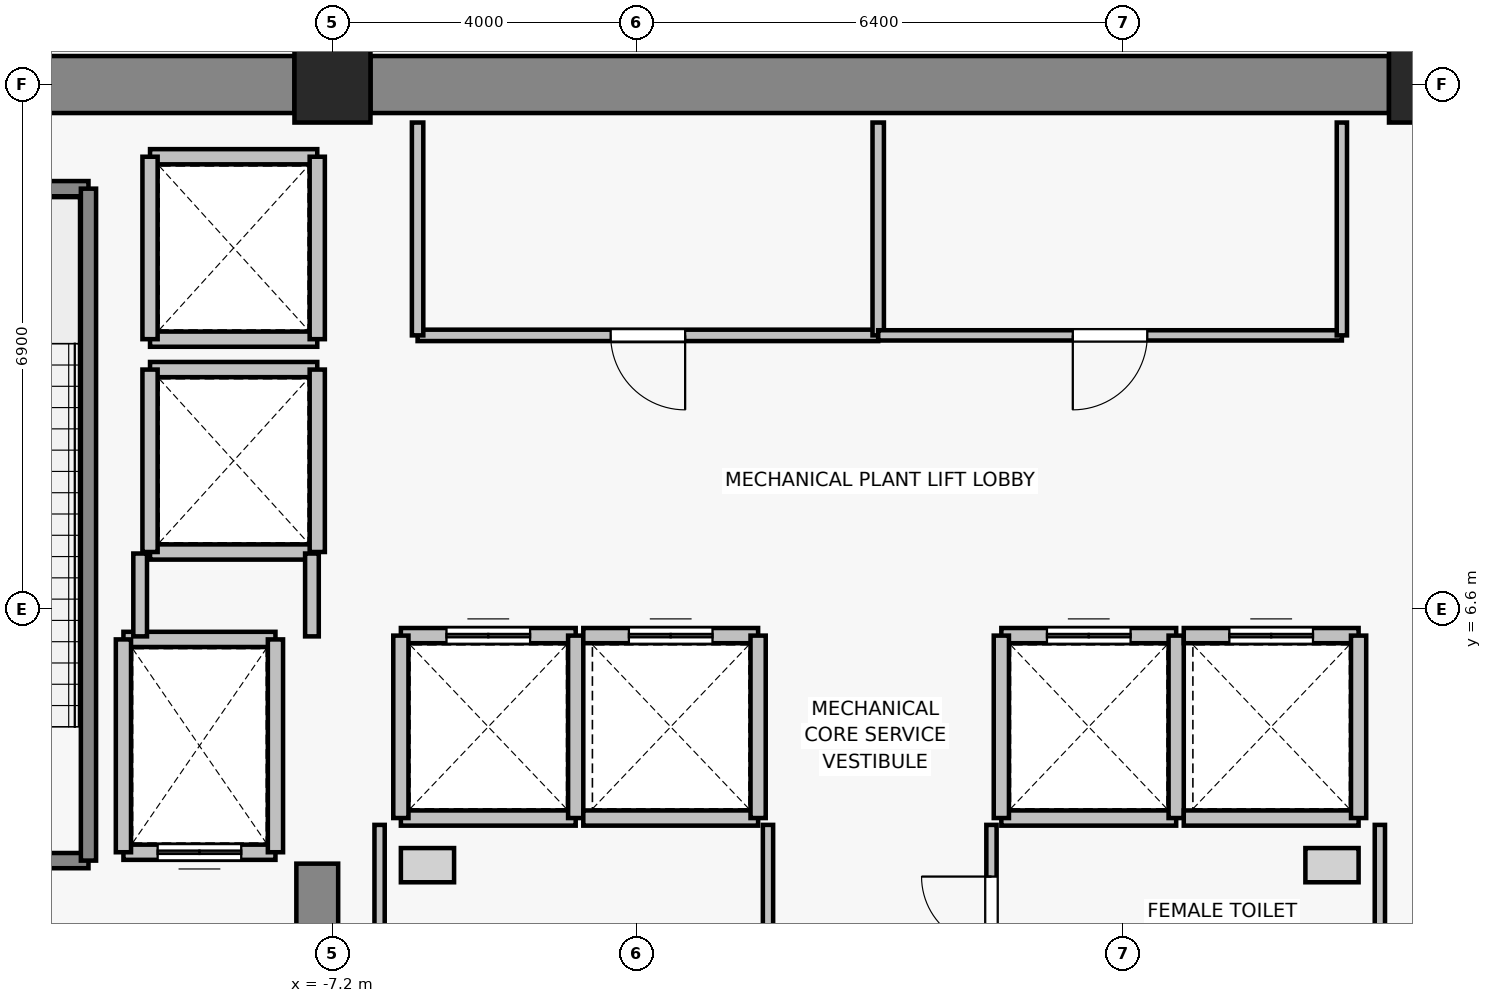
"""IFC4 building model, lengths in metres.
Left out: names, types, materials, properties, quantities, classifications, styles, units other than length and angle.
Written with IfcOpenShell. Run it as: python <this file> out.ifc"""

import sys

from ifc_helpers import new_model, si_unit, direction, frame, frame_2d, origin, origin_2d, place, context, subcontext, project, spatial, rectangle, extrude, source, transform, mapped, element, fill, save


model = new_model("IFC4")
c1 = context("Model", 3, precision=1e-05, world=origin(), true_north=direction((0.0, 1.0)))
c2 = subcontext(c1, "Body", "Model", "MODEL_VIEW")
j1 = project(units=[si_unit("LENGTHUNIT", "METRE"), si_unit("PLANEANGLEUNIT", "RADIAN")], contexts=[c1])
p1 = place(None, origin())
s1 = spatial("IfcSite", under=j1, at=p1, CompositionType="ELEMENT")
p2 = place(p1, origin())
s2 = spatial("IfcBuilding", under=s1, at=p2, CompositionType="ELEMENT")
p3 = place(p2, frame((0.0, 0.0, 139.6)))
s3 = spatial("IfcBuildingStorey", under=s2, at=p3, CompositionType="ELEMENT", Elevation=139.6)
for number, where, z_axis, x_axis in (
    (1, (-7.2, 13.5, 0.0), (0.0, 0.0, 1.0), (1.0, 0.0, 0.0)),
    (2, (7.2, 13.5, 0.0), (0.0, 0.0, 1.0), (1.0, 0.0, 0.0)),
):
    element("IfcColumn", number, at=place(p3, frame(where, z_axis=z_axis, x_axis=x_axis)), inside=s3, PredefinedType="COLUMN", context=c2, shape_type="SweptSolid", body=[
        extrude(rectangle(XDim=1.0, YDim=1.0, at=origin_2d()), origin(), (0.0, 0.0, 1.0), 6.6),
    ])
p4 = place(p3, frame((-13.9, 13.5, 0.0), z_axis=(0.0, 0.0, 1.0), x_axis=(1.0, 0.0, 0.0)))
e3 = element("IfcWall", 3, at=p4, inside=s3, PredefinedType="SHEAR", context=c2, shape_type="SweptSolid", body=[
    extrude(rectangle(XDim=6.2, YDim=0.75, at=frame_2d((3.1, 0.0))), origin(), (0.0, 0.0, 1.0), 6.375),
])
p5 = place(p3, frame((-6.7, 13.5, 0.0), z_axis=(0.0, 0.0, 1.0), x_axis=(1.0, 0.0, 0.0)))
e4 = element("IfcWall", 4, at=p5, inside=s3, PredefinedType="SHEAR", context=c2, shape_type="SweptSolid", body=[
    extrude(rectangle(XDim=13.4, YDim=0.75, at=frame_2d((6.7, 0.0))), origin(), (0.0, 0.0, 1.0), 6.375),
])
p6 = place(p3, frame((-7.4, -0.825, 0.0), z_axis=(0.0, 0.0, 1.0), x_axis=(0.0, 1.0, 0.0)))
e5 = element("IfcWall", 5, at=p6, inside=s3, PredefinedType="SHEAR", context=c2, shape_type="SweptSolid", body=[
    extrude(rectangle(XDim=4.075, YDim=0.55, at=frame_2d((2.038, 0.0))), origin(), (0.0, 0.0, 1.0), 6.375),
])
p7 = place(p3, frame((-7.95, 3.4, 0.0), z_axis=(0.0, 0.0, 1.0), x_axis=(-1.0, 0.0, 0.0)))
e6 = element("IfcWall", 6, at=p7, inside=s3, PredefinedType="SOLIDWALL", context=c2, shape_type="SweptSolid", body=[
    extrude(rectangle(XDim=2.0, YDim=0.2, at=frame_2d((1.0, 0.0))), origin(), (0.0, 0.0, 1.0), 6.375),
])
p8 = place(p7, frame((0.45, 0.0, 0.0)))
e7 = element("IfcOpeningElement", 7, at=p8, cuts=e6, PredefinedType="OPENING", context=c2, shape_type="SweptSolid", body=[
    extrude(rectangle(XDim=1.1, YDim=2.2, at=frame_2d((0.55, 1.1))), frame((0.0, 0.11, 0.0), z_axis=(0.0, -1.0, 0.0), x_axis=(1.0, 0.0, 0.0)), (0.0, 0.0, 1.0), 0.22),
])
p9 = place(p3, frame((-9.95, 6.2, 0.0), z_axis=(0.0, 0.0, 1.0), x_axis=(1.0, 0.0, 0.0)))
e8 = element("IfcWall", 8, at=p9, inside=s3, PredefinedType="SOLIDWALL", context=c2, shape_type="SweptSolid", body=[
    extrude(rectangle(XDim=2.0, YDim=0.2, at=frame_2d((1.0, 0.0))), origin(), (0.0, 0.0, 1.0), 6.375),
])
for number, where, z_axis, x_axis in (
    (9, (-9.95, 3.4, 0.0), (0.0, 0.0, 1.0), (0.0, 1.0, 0.0)),
    (10, (-7.95, 6.2, 0.0), (0.0, 0.0, 1.0), (0.0, -1.0, 0.0)),
):
    element("IfcWall", number, at=place(p3, frame(where, z_axis=z_axis, x_axis=x_axis)), inside=s3, PredefinedType="SOLIDWALL", context=c2, shape_type="SweptSolid", body=[
        extrude(rectangle(XDim=2.8, YDim=0.2, at=frame_2d((1.4, 0.0))), origin(), (0.0, 0.0, 1.0), 6.375),
    ])
p10 = place(p3, frame((-4.0, 3.85, 0.0), z_axis=(0.0, 0.0, 1.0), x_axis=(-1.0, 0.0, 0.0)))
e11 = element("IfcWall", 11, at=p10, inside=s3, PredefinedType="SOLIDWALL", context=c2, shape_type="SweptSolid", body=[
    extrude(rectangle(XDim=2.3, YDim=0.2, at=frame_2d((1.15, 0.0))), origin(), (0.0, 0.0, 1.0), 6.375),
])
p11 = place(p3, frame((-6.3, 6.25, 0.0), z_axis=(0.0, 0.0, 1.0), x_axis=(1.0, 0.0, 0.0)))
e12 = element("IfcWall", 12, at=p11, inside=s3, PredefinedType="SOLIDWALL", context=c2, shape_type="SweptSolid", body=[
    extrude(rectangle(XDim=2.3, YDim=0.2, at=frame_2d((1.15, 0.0))), origin(), (0.0, 0.0, 1.0), 6.375),
])
p12 = place(p11, frame((0.6, 0.0, 0.0)))
e13 = element("IfcOpeningElement", 13, at=p12, cuts=e12, PredefinedType="OPENING", context=c2, shape_type="SweptSolid", body=[
    extrude(rectangle(XDim=1.1, YDim=2.2, at=frame_2d((0.55, 1.1))), frame((0.0, 0.11, 0.0), z_axis=(0.0, -1.0, 0.0), x_axis=(1.0, 0.0, 0.0)), (0.0, 0.0, 1.0), 0.22),
])
for number, where, z_axis, x_axis in (
    (14, (-6.3, 3.85, 0.0), (0.0, 0.0, 1.0), (0.0, 1.0, 0.0)),
    (15, (-4.0, 6.25, 0.0), (0.0, 0.0, 1.0), (0.0, -1.0, 0.0)),
):
    element("IfcWall", number, at=place(p3, frame(where, z_axis=z_axis, x_axis=x_axis)), inside=s3, PredefinedType="SOLIDWALL", context=c2, shape_type="SweptSolid", body=[
        extrude(rectangle(XDim=2.4, YDim=0.2, at=frame_2d((1.2, 0.0))), origin(), (0.0, 0.0, 1.0), 6.375),
    ])
p13 = place(p3, frame((-1.6, 3.85, 0.0), z_axis=(0.0, 0.0, 1.0), x_axis=(-1.0, 0.0, 0.0)))
e16 = element("IfcWall", 16, at=p13, inside=s3, PredefinedType="SOLIDWALL", context=c2, shape_type="SweptSolid", body=[
    extrude(rectangle(XDim=2.3, YDim=0.2, at=frame_2d((1.15, 0.0))), origin(), (0.0, 0.0, 1.0), 6.375),
])
p14 = place(p3, frame((-3.9, 6.25, 0.0), z_axis=(0.0, 0.0, 1.0), x_axis=(1.0, 0.0, 0.0)))
e17 = element("IfcWall", 17, at=p14, inside=s3, PredefinedType="SOLIDWALL", context=c2, shape_type="SweptSolid", body=[
    extrude(rectangle(XDim=2.3, YDim=0.2, at=frame_2d((1.15, 0.0))), origin(), (0.0, 0.0, 1.0), 6.375),
])
p15 = place(p14, frame((0.6, 0.0, 0.0)))
e18 = element("IfcOpeningElement", 18, at=p15, cuts=e17, PredefinedType="OPENING", context=c2, shape_type="SweptSolid", body=[
    extrude(rectangle(XDim=1.1, YDim=2.2, at=frame_2d((0.55, 1.1))), frame((0.0, 0.11, 0.0), z_axis=(0.0, -1.0, 0.0), x_axis=(1.0, 0.0, 0.0)), (0.0, 0.0, 1.0), 0.22),
])
p16 = place(p3, frame((-1.6, 6.25, 0.0), z_axis=(0.0, 0.0, 1.0), x_axis=(0.0, -1.0, 0.0)))
e19 = element("IfcWall", 19, at=p16, inside=s3, PredefinedType="SOLIDWALL", context=c2, shape_type="SweptSolid", body=[
    extrude(rectangle(XDim=2.4, YDim=0.2, at=frame_2d((1.2, 0.0))), origin(), (0.0, 0.0, 1.0), 6.375),
])
p17 = place(p3, frame((3.9, 3.85, 0.0), z_axis=(0.0, 0.0, 1.0), x_axis=(-1.0, 0.0, 0.0)))
e20 = element("IfcWall", 20, at=p17, inside=s3, PredefinedType="SOLIDWALL", context=c2, shape_type="SweptSolid", body=[
    extrude(rectangle(XDim=2.3, YDim=0.2, at=frame_2d((1.15, 0.0))), origin(), (0.0, 0.0, 1.0), 6.375),
])
p18 = place(p3, frame((1.6, 6.25, 0.0), z_axis=(0.0, 0.0, 1.0), x_axis=(1.0, 0.0, 0.0)))
e21 = element("IfcWall", 21, at=p18, inside=s3, PredefinedType="SOLIDWALL", context=c2, shape_type="SweptSolid", body=[
    extrude(rectangle(XDim=2.3, YDim=0.2, at=frame_2d((1.15, 0.0))), origin(), (0.0, 0.0, 1.0), 6.375),
])
p19 = place(p18, frame((0.6, 0.0, 0.0)))
e22 = element("IfcOpeningElement", 22, at=p19, cuts=e21, PredefinedType="OPENING", context=c2, shape_type="SweptSolid", body=[
    extrude(rectangle(XDim=1.1, YDim=2.2, at=frame_2d((0.55, 1.1))), frame((0.0, 0.11, 0.0), z_axis=(0.0, -1.0, 0.0), x_axis=(1.0, 0.0, 0.0)), (0.0, 0.0, 1.0), 0.22),
])
for number, where, z_axis, x_axis in (
    (23, (1.6, 3.85, 0.0), (0.0, 0.0, 1.0), (0.0, 1.0, 0.0)),
    (24, (3.9, 6.25, 0.0), (0.0, 0.0, 1.0), (0.0, -1.0, 0.0)),
):
    element("IfcWall", number, at=place(p3, frame(where, z_axis=z_axis, x_axis=x_axis)), inside=s3, PredefinedType="SOLIDWALL", context=c2, shape_type="SweptSolid", body=[
        extrude(rectangle(XDim=2.4, YDim=0.2, at=frame_2d((1.2, 0.0))), origin(), (0.0, 0.0, 1.0), 6.375),
    ])
p20 = place(p3, frame((6.3, 3.85, 0.0), z_axis=(0.0, 0.0, 1.0), x_axis=(-1.0, 0.0, 0.0)))
e25 = element("IfcWall", 25, at=p20, inside=s3, PredefinedType="SOLIDWALL", context=c2, shape_type="SweptSolid", body=[
    extrude(rectangle(XDim=2.3, YDim=0.2, at=frame_2d((1.15, 0.0))), origin(), (0.0, 0.0, 1.0), 6.375),
])
p21 = place(p3, frame((4.0, 6.25, 0.0), z_axis=(0.0, 0.0, 1.0), x_axis=(1.0, 0.0, 0.0)))
e26 = element("IfcWall", 26, at=p21, inside=s3, PredefinedType="SOLIDWALL", context=c2, shape_type="SweptSolid", body=[
    extrude(rectangle(XDim=2.3, YDim=0.2, at=frame_2d((1.15, 0.0))), origin(), (0.0, 0.0, 1.0), 6.375),
])
p22 = place(p21, frame((0.6, 0.0, 0.0)))
e27 = element("IfcOpeningElement", 27, at=p22, cuts=e26, PredefinedType="OPENING", context=c2, shape_type="SweptSolid", body=[
    extrude(rectangle(XDim=1.1, YDim=2.2, at=frame_2d((0.55, 1.1))), frame((0.0, 0.11, 0.0), z_axis=(0.0, -1.0, 0.0), x_axis=(1.0, 0.0, 0.0)), (0.0, 0.0, 1.0), 0.22),
])
p23 = place(p3, frame((6.3, 6.25, 0.0), z_axis=(0.0, 0.0, 1.0), x_axis=(0.0, -1.0, 0.0)))
e28 = element("IfcWall", 28, at=p23, inside=s3, PredefinedType="SOLIDWALL", context=c2, shape_type="SweptSolid", body=[
    extrude(rectangle(XDim=2.4, YDim=0.2, at=frame_2d((1.2, 0.0))), origin(), (0.0, 0.0, 1.0), 6.375),
])
for number, where, z_axis, x_axis in (
    (29, (-7.4, 7.35, 0.0), (0.0, 0.0, 1.0), (-1.0, 0.0, 0.0)),
    (30, (-9.6, 9.75, 0.0), (0.0, 0.0, 1.0), (1.0, 0.0, 0.0)),
):
    element("IfcWall", number, at=place(p3, frame(where, z_axis=z_axis, x_axis=x_axis)), inside=s3, PredefinedType="SOLIDWALL", context=c2, shape_type="SweptSolid", body=[
        extrude(rectangle(XDim=2.2, YDim=0.2, at=frame_2d((1.1, 0.0))), origin(), (0.0, 0.0, 1.0), 5.865),
    ])
p24 = place(p3, frame((-9.6, 7.35, 0.0), z_axis=(0.0, 0.0, 1.0), x_axis=(0.0, 1.0, 0.0)))
e31 = element("IfcWall", 31, at=p24, inside=s3, PredefinedType="SOLIDWALL", context=c2, shape_type="SweptSolid", body=[
    extrude(rectangle(XDim=2.4, YDim=0.2, at=frame_2d((1.2, 0.0))), origin(), (0.0, 0.0, 1.0), 6.375),
])
p25 = place(p3, frame((-7.4, 9.75, 0.0), z_axis=(0.0, 0.0, 1.0), x_axis=(0.0, -1.0, 0.0)))
e32 = element("IfcWall", 32, at=p25, inside=s3, PredefinedType="SOLIDWALL", context=c2, shape_type="SweptSolid", body=[
    extrude(rectangle(XDim=2.4, YDim=0.2, at=frame_2d((1.2, 0.0))), origin(), (0.0, 0.0, 1.0), 5.865),
])
for number, where, z_axis, x_axis in (
    (33, (-7.4, 10.15, 0.0), (0.0, 0.0, 1.0), (-1.0, 0.0, 0.0)),
    (34, (-9.6, 12.55, 0.0), (0.0, 0.0, 1.0), (1.0, 0.0, 0.0)),
):
    element("IfcWall", number, at=place(p3, frame(where, z_axis=z_axis, x_axis=x_axis)), inside=s3, PredefinedType="SOLIDWALL", context=c2, shape_type="SweptSolid", body=[
        extrude(rectangle(XDim=2.2, YDim=0.2, at=frame_2d((1.1, 0.0))), origin(), (0.0, 0.0, 1.0), 5.865),
    ])
p26 = place(p3, frame((-9.6, 10.15, 0.0), z_axis=(0.0, 0.0, 1.0), x_axis=(0.0, 1.0, 0.0)))
e35 = element("IfcWall", 35, at=p26, inside=s3, PredefinedType="SOLIDWALL", context=c2, shape_type="SweptSolid", body=[
    extrude(rectangle(XDim=2.4, YDim=0.2, at=frame_2d((1.2, 0.0))), origin(), (0.0, 0.0, 1.0), 6.375),
])
p27 = place(p3, frame((-7.4, 12.55, 0.0), z_axis=(0.0, 0.0, 1.0), x_axis=(0.0, -1.0, 0.0)))
e36 = element("IfcWall", 36, at=p27, inside=s3, PredefinedType="SOLIDWALL", context=c2, shape_type="SweptSolid", body=[
    extrude(rectangle(XDim=2.4, YDim=0.2, at=frame_2d((1.2, 0.0))), origin(), (0.0, 0.0, 1.0), 5.865),
])
p28 = place(p3, frame((-10.41, 3.29, 0.0), z_axis=(0.0, 0.0, 1.0), x_axis=(-1.0, 0.0, 0.0)))
e37 = element("IfcWall", 37, at=p28, inside=s3, PredefinedType="SOLIDWALL", context=c2, shape_type="SweptSolid", body=[
    extrude(rectangle(XDim=3.52, YDim=0.2, at=frame_2d((1.76, 0.0))), origin(), (0.0, 0.0, 1.0), 6.375),
])
p29 = place(p28, frame((1.165, 0.0, 0.0)))
e38 = element("IfcOpeningElement", 38, at=p29, cuts=e37, PredefinedType="OPENING", context=c2, shape_type="SweptSolid", body=[
    extrude(rectangle(XDim=1.15, YDim=2.15, at=frame_2d((0.575, 1.075))), frame((0.0, 0.11, 0.0), z_axis=(0.0, -1.0, 0.0), x_axis=(1.0, 0.0, 0.0)), (0.0, 0.0, 1.0), 0.22),
])
p30 = place(p3, frame((-13.93, 12.13, 0.0), z_axis=(0.0, 0.0, 1.0), x_axis=(1.0, 0.0, 0.0)))
e39 = element("IfcWall", 39, at=p30, inside=s3, PredefinedType="SOLIDWALL", context=c2, shape_type="SweptSolid", body=[
    extrude(rectangle(XDim=3.52, YDim=0.2, at=frame_2d((1.76, 0.0))), origin(), (0.0, 0.0, 1.0), 6.375),
])
p31 = place(p3, frame((-10.41, 12.13, 0.0), z_axis=(0.0, 0.0, 1.0), x_axis=(0.0, -1.0, 0.0)))
e40 = element("IfcWall", 40, at=p31, inside=s3, PredefinedType="SOLIDWALL", context=c2, shape_type="SweptSolid", body=[
    extrude(rectangle(XDim=8.84, YDim=0.2, at=frame_2d((4.42, 0.0))), origin(), (0.0, 0.0, 1.0), 6.375),
])
p32 = place(p3, frame((-9.73, 6.24, 0.0), z_axis=(0.0, 0.0, 1.0), x_axis=(0.0, 1.0, 0.0)))
e41 = element("IfcWall", 41, at=p32, inside=s3, PredefinedType="PARTITIONING", context=c2, shape_type="SweptSolid", body=[
    extrude(rectangle(XDim=1.09, YDim=0.18, at=frame_2d((0.545, 0.0))), origin(), (0.0, 0.0, 1.0), 6.375),
])
p33 = place(p3, frame((-7.47, 7.33, 0.0), z_axis=(0.0, 0.0, 1.0), x_axis=(0.0, -1.0, 0.0)))
e42 = element("IfcWall", 42, at=p33, inside=s3, PredefinedType="PARTITIONING", context=c2, shape_type="SweptSolid", body=[
    extrude(rectangle(XDim=1.09, YDim=0.18, at=frame_2d((0.545, 0.0))), origin(), (0.0, 0.0, 1.0), 5.865),
])
p34 = place(p3, frame((-0.02, 10.2, 0.0), z_axis=(0.0, 0.0, 1.0), x_axis=(-1.0, 0.0, 0.0)))
e43 = element("IfcWall", 43, at=p34, inside=s3, PredefinedType="PARTITIONING", context=c2, shape_type="SweptSolid", body=[
    extrude(rectangle(XDim=6.06, YDim=0.15, at=frame_2d((3.03, 0.0))), origin(), (0.0, 0.0, 1.0), 6.375),
])
p35 = place(p34, frame((2.54, 0.0, 0.0)))
e44 = element("IfcOpeningElement", 44, at=p35, cuts=e43, PredefinedType="OPENING", context=c2, shape_type="SweptSolid", body=[
    extrude(rectangle(XDim=0.98, YDim=2.15, at=frame_2d((0.49, 1.075))), frame((0.0, 0.085, 0.0), z_axis=(0.0, -1.0, 0.0), x_axis=(1.0, 0.0, 0.0)), (0.0, 0.0, 1.0), 0.17),
])
for number, where, z_axis, x_axis in (
    (45, (-6.08, 10.2, 0.0), (0.0, 0.0, 1.0), (0.0, 1.0, 0.0)),
    (46, (-0.02, 13.0, 0.0), (0.0, 0.0, 1.0), (0.0, -1.0, 0.0)),
):
    element("IfcWall", number, at=place(p3, frame(where, z_axis=z_axis, x_axis=x_axis)), inside=s3, PredefinedType="PARTITIONING", context=c2, shape_type="SweptSolid", body=[
        extrude(rectangle(XDim=2.8, YDim=0.15, at=frame_2d((1.4, 0.0))), origin(), (0.0, 0.0, 1.0), 6.375),
    ])
p36 = place(p3, frame((6.08, 10.2, 0.0), z_axis=(0.0, 0.0, 1.0), x_axis=(-1.0, 0.0, 0.0)))
e47 = element("IfcWall", 47, at=p36, inside=s3, PredefinedType="PARTITIONING", context=c2, shape_type="SweptSolid", body=[
    extrude(rectangle(XDim=6.1, YDim=0.135, at=frame_2d((3.05, 0.0))), origin(), (0.0, 0.0, 1.0), 6.375),
])
p37 = place(p36, frame((2.56, 0.0, 0.0)))
e48 = element("IfcOpeningElement", 48, at=p37, cuts=e47, PredefinedType="OPENING", context=c2, shape_type="SweptSolid", body=[
    extrude(rectangle(XDim=0.98, YDim=2.15, at=frame_2d((0.49, 1.075))), frame((0.0, 0.077, 0.0), z_axis=(0.0, -1.0, 0.0), x_axis=(1.0, 0.0, 0.0)), (0.0, 0.0, 1.0), 0.155),
])
p38 = place(p3, frame((6.08, 13.0, 0.0), z_axis=(0.0, 0.0, 1.0), x_axis=(0.0, -1.0, 0.0)))
e49 = element("IfcWall", 49, at=p38, inside=s3, PredefinedType="PARTITIONING", context=c2, shape_type="SweptSolid", body=[
    extrude(rectangle(XDim=2.8, YDim=0.135, at=frame_2d((1.4, 0.0))), origin(), (0.0, 0.0, 1.0), 6.375),
])
p39 = place(p3, frame((-6.58, -0.73, 0.0), z_axis=(0.0, 0.0, 1.0), x_axis=(0.0, 1.0, 0.0)))
e50 = element("IfcWall", 50, at=p39, inside=s3, PredefinedType="PARTITIONING", context=c2, shape_type="SweptSolid", body=[
    extrude(rectangle(XDim=4.49, YDim=0.135, at=frame_2d((2.245, 0.0))), origin(), (0.0, 0.0, 1.0), 6.375),
])
p40 = place(p3, frame((-1.47, 3.76, 0.0), z_axis=(0.0, 0.0, 1.0), x_axis=(0.0, -1.0, 0.0)))
e51 = element("IfcWall", 51, at=p40, inside=s3, PredefinedType="PARTITIONING", context=c2, shape_type="SweptSolid", body=[
    extrude(rectangle(XDim=4.49, YDim=0.135, at=frame_2d((2.245, 0.0))), origin(), (0.0, 0.0, 1.0), 6.375),
])
p41 = place(p40, frame((1.8, 0.0, 0.0)))
e52 = element("IfcOpeningElement", 52, at=p41, cuts=e51, PredefinedType="OPENING", context=c2, shape_type="SweptSolid", body=[
    extrude(rectangle(XDim=0.92, YDim=2.1, at=frame_2d((0.46, 1.05))), frame((0.0, 0.077, 0.0), z_axis=(0.0, -1.0, 0.0), x_axis=(1.0, 0.0, 0.0)), (0.0, 0.0, 1.0), 0.155),
])
p42 = place(p3, frame((1.47, 1.48, 0.0), z_axis=(0.0, 0.0, 1.0), x_axis=(0.0, 1.0, 0.0)))
e53 = element("IfcWall", 53, at=p42, inside=s3, PredefinedType="PARTITIONING", context=c2, shape_type="SweptSolid", body=[
    extrude(rectangle(XDim=2.28, YDim=0.135, at=frame_2d((1.14, 0.0))), origin(), (0.0, 0.0, 1.0), 6.375),
])
p43 = place(p42, frame((0.68, 0.0, 0.0)))
e54 = element("IfcOpeningElement", 54, at=p43, cuts=e53, PredefinedType="OPENING", context=c2, shape_type="SweptSolid", body=[
    extrude(rectangle(XDim=0.92, YDim=2.1, at=frame_2d((0.46, 1.05))), frame((0.0, 0.077, 0.0), z_axis=(0.0, -1.0, 0.0), x_axis=(1.0, 0.0, 0.0)), (0.0, 0.0, 1.0), 0.155),
])
p44 = place(p3, frame((6.58, 3.76, 0.0), z_axis=(0.0, 0.0, 1.0), x_axis=(0.0, -1.0, 0.0)))
e55 = element("IfcWall", 55, at=p44, inside=s3, PredefinedType="PARTITIONING", context=c2, shape_type="SweptSolid", body=[
    extrude(rectangle(XDim=2.28, YDim=0.135, at=frame_2d((1.14, 0.0))), origin(), (0.0, 0.0, 1.0), 6.375),
])
m1 = source(origin(), c2, "Body", "SweptSolid", [
    extrude(rectangle(XDim=1.1, YDim=2.2, at=frame_2d((0.55, 1.1))), frame((0.0, 0.025, 0.0), z_axis=(0.0, -1.0, 0.0), x_axis=(1.0, 0.0, 0.0)), (0.0, 0.0, 1.0), 0.05),
])
p45 = place(p8, origin())
e56 = element("IfcDoor", 56, at=p45, inside=s3, OperationType="DOUBLE_DOOR_SLIDING", PredefinedType="DOOR", context=c2, shape_type="MappedRepresentation", body=[
    mapped(m1, transform((0.0, 0.0, 0.0), x_axis=(1.0, 0.0, 0.0), y_axis=(0.0, 1.0, 0.0), z_axis=(0.0, 0.0, 1.0), scale=1.0)),
])
fill(e7, e56)
p46 = place(p12, origin())
e57 = element("IfcDoor", 57, at=p46, inside=s3, OperationType="DOUBLE_DOOR_SLIDING", PredefinedType="DOOR", context=c2, shape_type="MappedRepresentation", body=[
    mapped(m1, transform((0.0, 0.0, 0.0), x_axis=(1.0, 0.0, 0.0), y_axis=(0.0, 1.0, 0.0), z_axis=(0.0, 0.0, 1.0), scale=1.0)),
])
fill(e13, e57)
p47 = place(p15, origin())
e58 = element("IfcDoor", 58, at=p47, inside=s3, OperationType="DOUBLE_DOOR_SLIDING", PredefinedType="DOOR", context=c2, shape_type="MappedRepresentation", body=[
    mapped(m1, transform((0.0, 0.0, 0.0), x_axis=(1.0, 0.0, 0.0), y_axis=(0.0, 1.0, 0.0), z_axis=(0.0, 0.0, 1.0), scale=1.0)),
])
fill(e18, e58)
p48 = place(p19, origin())
e59 = element("IfcDoor", 59, at=p48, inside=s3, OperationType="DOUBLE_DOOR_SLIDING", PredefinedType="DOOR", context=c2, shape_type="MappedRepresentation", body=[
    mapped(m1, transform((0.0, 0.0, 0.0), x_axis=(1.0, 0.0, 0.0), y_axis=(0.0, 1.0, 0.0), z_axis=(0.0, 0.0, 1.0), scale=1.0)),
])
fill(e22, e59)
p49 = place(p22, origin())
e60 = element("IfcDoor", 60, at=p49, inside=s3, OperationType="DOUBLE_DOOR_SLIDING", PredefinedType="DOOR", context=c2, shape_type="MappedRepresentation", body=[
    mapped(m1, transform((0.0, 0.0, 0.0), x_axis=(1.0, 0.0, 0.0), y_axis=(0.0, 1.0, 0.0), z_axis=(0.0, 0.0, 1.0), scale=1.0)),
])
fill(e27, e60)
m2 = source(origin(), c2, "Body", "SweptSolid", [
    extrude(rectangle(XDim=0.98, YDim=2.15, at=frame_2d((0.49, 1.075))), frame((0.0, 0.025, 0.0), z_axis=(0.0, -1.0, 0.0), x_axis=(1.0, 0.0, 0.0)), (0.0, 0.0, 1.0), 0.05),
])
p50 = place(p35, origin())
e61 = element("IfcDoor", 61, at=p50, inside=s3, OperationType="SINGLE_SWING_LEFT", PredefinedType="DOOR", context=c2, shape_type="MappedRepresentation", body=[
    mapped(m2, transform((0.0, 0.0, 0.0), x_axis=(1.0, 0.0, 0.0), y_axis=(0.0, 1.0, 0.0), z_axis=(0.0, 0.0, 1.0), scale=1.0)),
])
fill(e44, e61)
p51 = place(p37, origin())
e62 = element("IfcDoor", 62, at=p51, inside=s3, OperationType="SINGLE_SWING_RIGHT", PredefinedType="DOOR", context=c2, shape_type="MappedRepresentation", body=[
    mapped(m2, transform((0.0, 0.0, 0.0), x_axis=(1.0, 0.0, 0.0), y_axis=(0.0, 1.0, 0.0), z_axis=(0.0, 0.0, 1.0), scale=1.0)),
])
fill(e48, e62)
m3 = source(origin(), c2, "Body", "SweptSolid", [
    extrude(rectangle(XDim=0.92, YDim=2.1, at=frame_2d((0.46, 1.05))), frame((0.0, 0.025, 0.0), z_axis=(0.0, -1.0, 0.0), x_axis=(1.0, 0.0, 0.0)), (0.0, 0.0, 1.0), 0.05),
])
p52 = place(p43, origin())
e63 = element("IfcDoor", 63, at=p52, inside=s3, OperationType="SINGLE_SWING_RIGHT", PredefinedType="DOOR", context=c2, shape_type="MappedRepresentation", body=[
    mapped(m3, transform((0.0, 0.0, 0.0), x_axis=(1.0, 0.0, 0.0), y_axis=(0.0, 1.0, 0.0), z_axis=(0.0, 0.0, 1.0), scale=1.0)),
])
fill(e54, e63)
save(model, sys.argv[1])
